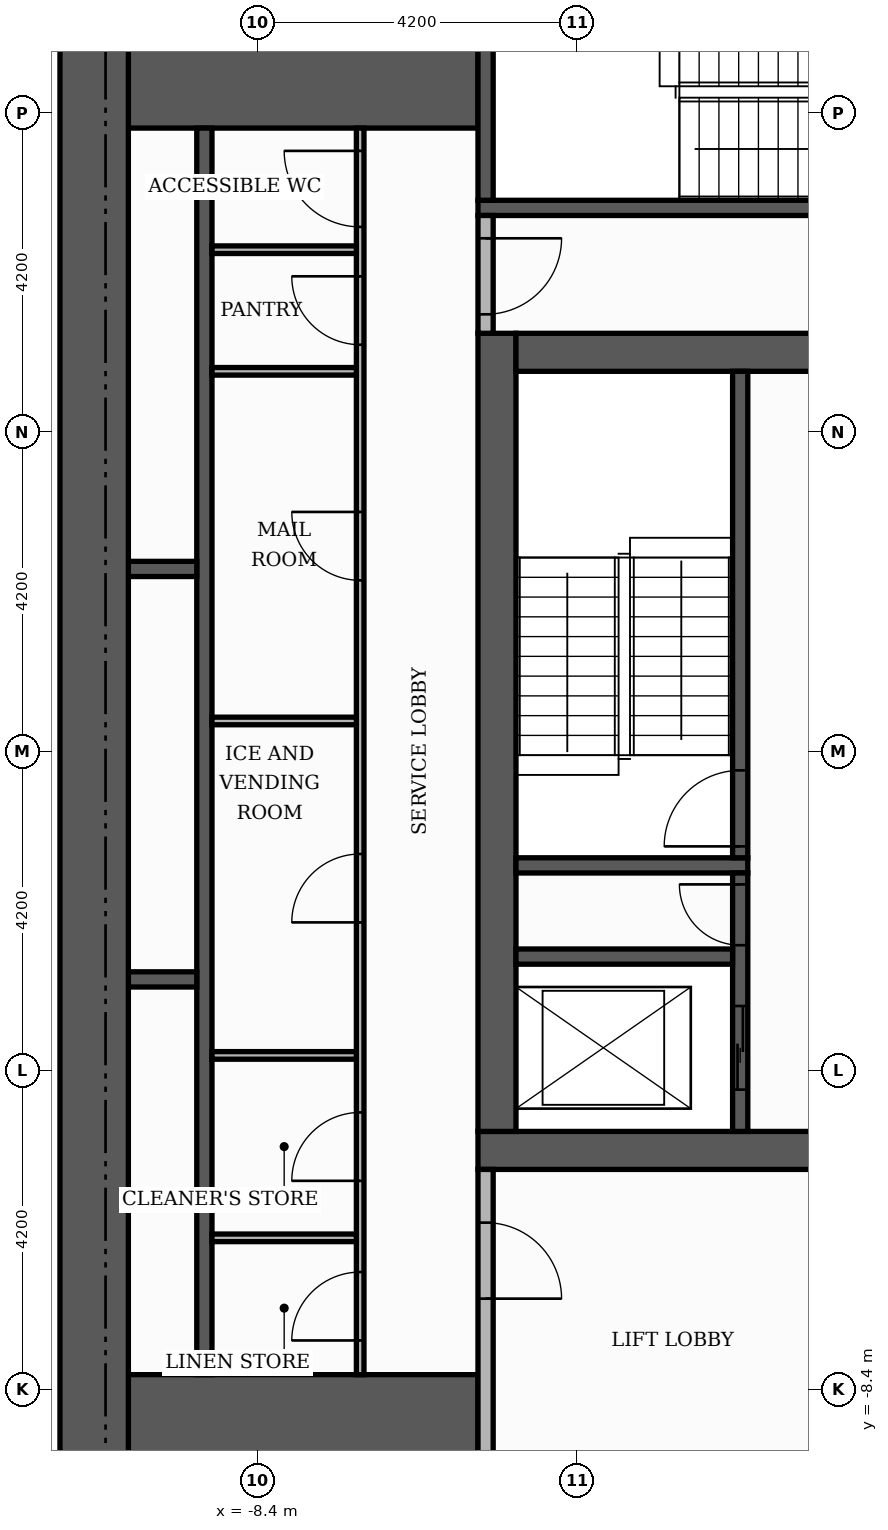
"""IFC4 building model, lengths in metres.
Left out: names, types, materials, properties, quantities, classifications, styles, units other than length and angle.
Written with IfcOpenShell. Run it as: python <this file> out.ifc"""

import sys

from ifc_helpers import new_model, si_unit, direction, frame, frame_2d, origin, place, context, subcontext, project, spatial, rectangle, extrude, element, fill, save


model = new_model("IFC4")
c1 = context("Model", 3, precision=1e-05, world=origin(), true_north=direction((0.0, 1.0)))
c2 = subcontext(c1, "Body", "Model", "MODEL_VIEW")
j1 = project(units=[si_unit("LENGTHUNIT", "METRE"), si_unit("PLANEANGLEUNIT", "RADIAN")], contexts=[c1])
p1 = place(None, origin())
s1 = spatial("IfcSite", under=j1, at=p1, CompositionType="ELEMENT")
p2 = place(p1, origin())
s2 = spatial("IfcBuilding", under=s1, at=p2, CompositionType="ELEMENT")
p3 = place(p2, frame((0.0, 0.0, 204.0)))
s3 = spatial("IfcBuildingStorey", under=s2, at=p3, CompositionType="ELEMENT", Elevation=204.0)
p4 = place(p3, frame((-5.5, -5.25, 0.0), z_axis=(0.0, 0.0, 1.0), x_axis=(1.0, 0.0, 0.0)))
e1 = element("IfcWall", 1, at=p4, inside=s3, PredefinedType="SHEAR", context=c2, shape_type="SweptSolid", body=[
    extrude(rectangle(XDim=11.0, YDim=0.5, at=frame_2d((5.5, 0.0))), origin(), (0.0, 0.0, 1.0), 3.48),
])
p5 = place(p4, frame((4.9, 0.0, 0.0)))
e2 = element("IfcOpeningElement", 2, at=p5, cuts=e1, PredefinedType="OPENING", context=c2, shape_type="SweptSolid", body=[
    extrude(rectangle(XDim=1.2, YDim=2.1, at=frame_2d((0.6, 1.05))), frame((0.0, 0.26, 0.0), z_axis=(0.0, -1.0, 0.0), x_axis=(1.0, 0.0, 0.0)), (0.0, 0.0, 1.0), 0.52),
])
p6 = place(p3, frame((-5.25, -5.0, 0.0), z_axis=(0.0, 0.0, 1.0), x_axis=(0.0, 1.0, 0.0)))
e3 = element("IfcWall", 3, at=p6, inside=s3, PredefinedType="SHEAR", context=c2, shape_type="SweptSolid", body=[
    extrude(rectangle(XDim=10.5, YDim=0.5, at=frame_2d((5.25, 0.0))), origin(), (0.0, 0.0, 1.0), 3.48),
])
p7 = place(p3, frame((-5.0, 5.25, 0.0), z_axis=(0.0, 0.0, 1.0), x_axis=(1.0, 0.0, 0.0)))
e4 = element("IfcWall", 4, at=p7, inside=s3, PredefinedType="SHEAR", context=c2, shape_type="SweptSolid", body=[
    extrude(rectangle(XDim=10.0, YDim=0.5, at=frame_2d((5.0, 0.0))), origin(), (0.0, 0.0, 1.0), 3.48),
])
p8 = place(p7, frame((4.4, 0.0, 0.0)))
e5 = element("IfcOpeningElement", 5, at=p8, cuts=e4, PredefinedType="OPENING", context=c2, shape_type="SweptSolid", body=[
    extrude(rectangle(XDim=1.2, YDim=2.1, at=frame_2d((0.6, 1.05))), frame((0.0, 0.26, 0.0), z_axis=(0.0, -1.0, 0.0), x_axis=(1.0, 0.0, 0.0)), (0.0, 0.0, 1.0), 0.52),
])
for number, where, z_axis, x_axis in (
    (6, (-10.1, -9.15, 0.0), (0.0, 0.0, 1.0), (1.0, 0.0, 0.0)),
    (7, (-10.1, 9.15, 0.0), (0.0, 0.0, 1.0), (1.0, 0.0, 0.0)),
):
    element("IfcWall", number, at=place(p3, frame(where, z_axis=z_axis, x_axis=x_axis)), inside=s3, PredefinedType="SHEAR", context=c2, shape_type="SweptSolid", body=[
        extrude(rectangle(XDim=4.6, YDim=1.9, at=frame_2d((2.3, 0.0))), origin(), (0.0, 0.0, 1.0), 3.48),
    ])
p9 = place(p3, frame((-5.0, -1.5, 0.0), z_axis=(0.0, 0.0, 1.0), x_axis=(1.0, 0.0, 0.0)))
e8 = element("IfcWall", 8, at=p9, inside=s3, PredefinedType="SHEAR", context=c2, shape_type="SweptSolid", body=[
    extrude(rectangle(XDim=3.05, YDim=0.2, at=frame_2d((1.525, 0.0))), origin(), (0.0, 0.0, 1.0), 3.48),
])
p10 = place(p3, frame((-2.05, -1.4, 0.0), z_axis=(0.0, 0.0, 1.0), x_axis=(0.0, 1.0, 0.0)))
e9 = element("IfcWall", 9, at=p10, inside=s3, PredefinedType="SHEAR", context=c2, shape_type="SweptSolid", body=[
    extrude(rectangle(XDim=6.4, YDim=0.2, at=frame_2d((3.2, 0.0))), origin(), (0.0, 0.0, 1.0), 3.48),
])
p11 = place(p10, frame((0.15, 0.0, 0.0)))
e10 = element("IfcOpeningElement", 10, at=p11, cuts=e9, PredefinedType="OPENING", context=c2, shape_type="SweptSolid", body=[
    extrude(rectangle(XDim=1.0, YDim=2.1, at=frame_2d((0.5, 1.05))), frame((0.0, 0.11, 0.0), z_axis=(0.0, -1.0, 0.0), x_axis=(1.0, 0.0, 0.0)), (0.0, 0.0, 1.0), 0.22),
])
p12 = place(p3, frame((-5.5, 7.15, 0.0), z_axis=(0.0, 0.0, 1.0), x_axis=(1.0, 0.0, 0.0)))
e11 = element("IfcWall", 11, at=p12, inside=s3, PredefinedType="SHEAR", context=c2, shape_type="SweptSolid", body=[
    extrude(rectangle(XDim=6.8, YDim=0.2, at=frame_2d((3.4, 0.0))), origin(), (0.0, 0.0, 1.0), 3.48),
])
p13 = place(p3, frame((-5.4, 7.25, 0.0), z_axis=(0.0, 0.0, 1.0), x_axis=(0.0, 1.0, 0.0)))
e12 = element("IfcWall", 12, at=p13, inside=s3, PredefinedType="SHEAR", context=c2, shape_type="SweptSolid", body=[
    extrude(rectangle(XDim=2.85, YDim=0.2, at=frame_2d((1.425, 0.0))), origin(), (0.0, 0.0, 1.0), 3.48),
])
p14 = place(p3, frame((-9.1, -8.2, 0.0), z_axis=(0.0, 0.0, 1.0), x_axis=(0.0, 1.0, 0.0)))
e13 = element("IfcWall", 13, at=p14, inside=s3, PredefinedType="SHEAR", context=c2, shape_type="SweptSolid", body=[
    extrude(rectangle(XDim=16.4, YDim=0.2, at=frame_2d((8.2, 0.0))), origin(), (0.0, 0.0, 1.0), 3.48),
])
p15 = place(p3, frame((-2.05, -5.0, 0.0), z_axis=(0.0, 0.0, 1.0), x_axis=(0.0, 1.0, 0.0)))
e14 = element("IfcWall", 14, at=p15, inside=s3, PredefinedType="SHEAR", context=c2, shape_type="SweptSolid", body=[
    extrude(rectangle(XDim=3.4, YDim=0.2, at=frame_2d((1.7, 0.0))), origin(), (0.0, 0.0, 1.0), 3.48),
])
p16 = place(p15, frame((0.55, 0.0, 0.0)))
e15 = element("IfcOpeningElement", 15, at=p16, cuts=e14, PredefinedType="OPENING", context=c2, shape_type="SweptSolid", body=[
    extrude(rectangle(XDim=1.1, YDim=2.1, at=frame_2d((0.55, 1.05))), frame((0.0, 0.11, 0.0), z_axis=(0.0, -1.0, 0.0), x_axis=(1.0, 0.0, 0.0)), (0.0, 0.0, 1.0), 0.22),
])
p17 = place(p15, frame((2.45, 0.0, 0.0)))
e16 = element("IfcOpeningElement", 16, at=p17, cuts=e14, PredefinedType="OPENING", context=c2, shape_type="SweptSolid", body=[
    extrude(rectangle(XDim=0.8, YDim=2.1, at=frame_2d((0.4, 1.05))), frame((0.0, 0.11, 0.0), z_axis=(0.0, -1.0, 0.0), x_axis=(1.0, 0.0, 0.0)), (0.0, 0.0, 1.0), 0.22),
])
p18 = place(p3, frame((-10.1, -3.0, 0.0), z_axis=(0.0, 0.0, 1.0), x_axis=(1.0, 0.0, 0.0)))
e17 = element("IfcWall", 17, at=p18, inside=s3, PredefinedType="SHEAR", context=c2, shape_type="SweptSolid", body=[
    extrude(rectangle(XDim=0.9, YDim=0.2, at=frame_2d((0.45, 0.0))), origin(), (0.0, 0.0, 1.0), 3.48),
])
p19 = place(p3, frame((-5.0, -2.7, 0.0), z_axis=(0.0, 0.0, 1.0), x_axis=(1.0, 0.0, 0.0)))
e18 = element("IfcWall", 18, at=p19, inside=s3, PredefinedType="SHEAR", context=c2, shape_type="SweptSolid", body=[
    extrude(rectangle(XDim=2.85, YDim=0.2, at=frame_2d((1.425, 0.0))), origin(), (0.0, 0.0, 1.0), 3.48),
])
p20 = place(p3, frame((-10.1, 2.4, 0.0), z_axis=(0.0, 0.0, 1.0), x_axis=(1.0, 0.0, 0.0)))
e19 = element("IfcWall", 19, at=p20, inside=s3, PredefinedType="SHEAR", context=c2, shape_type="SweptSolid", body=[
    extrude(rectangle(XDim=0.9, YDim=0.2, at=frame_2d((0.45, 0.0))), origin(), (0.0, 0.0, 1.0), 3.48),
])
p21 = place(p3, frame((-10.55, -10.1, 0.0), z_axis=(0.0, 0.0, 1.0), x_axis=(0.0, 1.0, 0.0)))
e20 = element("IfcWall", 20, at=p21, inside=s3, PredefinedType="SHEAR", context=c2, shape_type="SweptSolid", body=[
    extrude(rectangle(XDim=20.2, YDim=0.9, at=frame_2d((10.1, 0.0))), origin(), (0.0, 0.0, 1.0), 3.48),
])
p22 = place(p3, frame((-5.4, -10.1, 0.0), z_axis=(0.0, 0.0, 1.0), x_axis=(0.0, 1.0, 0.0)))
e21 = element("IfcWall", 21, at=p22, inside=s3, PredefinedType="PARTITIONING", context=c2, shape_type="SweptSolid", body=[
    extrude(rectangle(XDim=4.6, YDim=0.2, at=frame_2d((2.3, 0.0))), origin(), (0.0, 0.0, 1.0), 3.48),
])
p23 = place(p22, frame((2.9, 0.0, 0.0)))
e22 = element("IfcOpeningElement", 22, at=p23, cuts=e21, PredefinedType="OPENING", context=c2, shape_type="SweptSolid", body=[
    extrude(rectangle(XDim=1.0, YDim=2.1, at=frame_2d((0.5, 1.05))), frame((0.0, 0.11, 0.0), z_axis=(0.0, -1.0, 0.0), x_axis=(1.0, 0.0, 0.0)), (0.0, 0.0, 1.0), 0.22),
])
p24 = place(p3, frame((-7.05, -8.2, 0.0), z_axis=(0.0, 0.0, 1.0), x_axis=(0.0, 1.0, 0.0)))
e23 = element("IfcWall", 23, at=p24, inside=s3, PredefinedType="PARTITIONING", context=c2, shape_type="SweptSolid", body=[
    extrude(rectangle(XDim=16.4, YDim=0.1, at=frame_2d((8.2, 0.0))), origin(), (0.0, 0.0, 1.0), 3.48),
])
p25 = place(p24, frame((0.45, 0.0, 0.0)))
e24 = element("IfcOpeningElement", 24, at=p25, cuts=e23, PredefinedType="OPENING", context=c2, shape_type="SweptSolid", body=[
    extrude(rectangle(XDim=0.9, YDim=2.1, at=frame_2d((0.45, 1.05))), frame((0.0, 0.06, 0.0), z_axis=(0.0, -1.0, 0.0), x_axis=(1.0, 0.0, 0.0)), (0.0, 0.0, 1.0), 0.12),
])
p26 = place(p24, frame((2.55, 0.0, 0.0)))
e25 = element("IfcOpeningElement", 25, at=p26, cuts=e23, PredefinedType="OPENING", context=c2, shape_type="SweptSolid", body=[
    extrude(rectangle(XDim=0.9, YDim=2.1, at=frame_2d((0.45, 1.05))), frame((0.0, 0.06, 0.0), z_axis=(0.0, -1.0, 0.0), x_axis=(1.0, 0.0, 0.0)), (0.0, 0.0, 1.0), 0.12),
])
p27 = place(p24, frame((5.95, 0.0, 0.0)))
e26 = element("IfcOpeningElement", 26, at=p27, cuts=e23, PredefinedType="OPENING", context=c2, shape_type="SweptSolid", body=[
    extrude(rectangle(XDim=0.9, YDim=2.1, at=frame_2d((0.45, 1.05))), frame((0.0, 0.06, 0.0), z_axis=(0.0, -1.0, 0.0), x_axis=(1.0, 0.0, 0.0)), (0.0, 0.0, 1.0), 0.12),
])
p28 = place(p24, frame((10.45, 0.0, 0.0)))
e27 = element("IfcOpeningElement", 27, at=p28, cuts=e23, PredefinedType="OPENING", context=c2, shape_type="SweptSolid", body=[
    extrude(rectangle(XDim=0.9, YDim=2.1, at=frame_2d((0.45, 1.05))), frame((0.0, 0.06, 0.0), z_axis=(0.0, -1.0, 0.0), x_axis=(1.0, 0.0, 0.0)), (0.0, 0.0, 1.0), 0.12),
])
p29 = place(p24, frame((13.55, 0.0, 0.0)))
e28 = element("IfcOpeningElement", 28, at=p29, cuts=e23, PredefinedType="OPENING", context=c2, shape_type="SweptSolid", body=[
    extrude(rectangle(XDim=0.9, YDim=2.1, at=frame_2d((0.45, 1.05))), frame((0.0, 0.06, 0.0), z_axis=(0.0, -1.0, 0.0), x_axis=(1.0, 0.0, 0.0)), (0.0, 0.0, 1.0), 0.12),
])
p30 = place(p24, frame((15.1, 0.0, 0.0)))
e29 = element("IfcOpeningElement", 29, at=p30, cuts=e23, PredefinedType="OPENING", context=c2, shape_type="SweptSolid", body=[
    extrude(rectangle(XDim=1.0, YDim=2.1, at=frame_2d((0.5, 1.05))), frame((0.0, 0.06, 0.0), z_axis=(0.0, -1.0, 0.0), x_axis=(1.0, 0.0, 0.0)), (0.0, 0.0, 1.0), 0.12),
])
for number, where, z_axis, x_axis in (
    (30, (-9.0, -6.4, 0.0), (0.0, 0.0, 1.0), (1.0, 0.0, 0.0)),
    (31, (-9.0, -4.0, 0.0), (0.0, 0.0, 1.0), (1.0, 0.0, 0.0)),
    (32, (-9.0, 0.4, 0.0), (0.0, 0.0, 1.0), (1.0, 0.0, 0.0)),
    (33, (-9.0, 5.0, 0.0), (0.0, 0.0, 1.0), (1.0, 0.0, 0.0)),
):
    element("IfcWall", number, at=place(p3, frame(where, z_axis=z_axis, x_axis=x_axis)), inside=s3, PredefinedType="PARTITIONING", context=c2, shape_type="SweptSolid", body=[
        extrude(rectangle(XDim=1.9, YDim=0.1, at=frame_2d((0.95, 0.0))), origin(), (0.0, 0.0, 1.0), 3.48),
    ])
p31 = place(p3, frame((-5.4, 5.5, 0.0), z_axis=(0.0, 0.0, 1.0), x_axis=(0.0, 1.0, 0.0)))
e34 = element("IfcWall", 34, at=p31, inside=s3, PredefinedType="PARTITIONING", context=c2, shape_type="SweptSolid", body=[
    extrude(rectangle(XDim=1.55, YDim=0.2, at=frame_2d((0.775, 0.0))), origin(), (0.0, 0.0, 1.0), 3.48),
])
p32 = place(p31, frame((0.25, 0.0, 0.0)))
e35 = element("IfcOpeningElement", 35, at=p32, cuts=e34, PredefinedType="OPENING", context=c2, shape_type="SweptSolid", body=[
    extrude(rectangle(XDim=1.0, YDim=2.1, at=frame_2d((0.5, 1.05))), frame((0.0, 0.11, 0.0), z_axis=(0.0, -1.0, 0.0), x_axis=(1.0, 0.0, 0.0)), (0.0, 0.0, 1.0), 0.22),
])
p33 = place(p3, frame((-9.0, 6.6, 0.0), z_axis=(0.0, 0.0, 1.0), x_axis=(1.0, 0.0, 0.0)))
e36 = element("IfcWall", 36, at=p33, inside=s3, PredefinedType="PARTITIONING", context=c2, shape_type="SweptSolid", body=[
    extrude(rectangle(XDim=1.9, YDim=0.1, at=frame_2d((0.95, 0.0))), origin(), (0.0, 0.0, 1.0), 3.48),
])
p34 = place(p16, origin())
e37 = element("IfcDoor", 37, at=p34, inside=s3, OperationType="SLIDING_TO_LEFT", PredefinedType="DOOR", context=c2, shape_type="SweptSolid", body=[
    extrude(rectangle(XDim=1.1, YDim=2.1, at=frame_2d((0.55, 1.05))), frame((0.0, 0.025, 0.0), z_axis=(0.0, -1.0, 0.0), x_axis=(1.0, 0.0, 0.0)), (0.0, 0.0, 1.0), 0.05),
])
fill(e15, e37)
p35 = place(p11, origin())
e38 = element("IfcDoor", 38, at=p35, inside=s3, OperationType="SINGLE_SWING_LEFT", PredefinedType="DOOR", context=c2, shape_type="SweptSolid", body=[
    extrude(rectangle(XDim=1.0, YDim=2.1, at=frame_2d((0.5, 1.05))), frame((0.0, 0.025, 0.0), z_axis=(0.0, -1.0, 0.0), x_axis=(1.0, 0.0, 0.0)), (0.0, 0.0, 1.0), 0.05),
])
fill(e10, e38)
p36 = place(p17, origin())
e39 = element("IfcDoor", 39, at=p36, inside=s3, OperationType="SINGLE_SWING_RIGHT", PredefinedType="DOOR", context=c2, shape_type="SweptSolid", body=[
    extrude(rectangle(XDim=0.8, YDim=2.1, at=frame_2d((0.4, 1.05))), frame((0.0, 0.025, 0.0), z_axis=(0.0, -1.0, 0.0), x_axis=(1.0, 0.0, 0.0)), (0.0, 0.0, 1.0), 0.05),
])
fill(e16, e39)
p37 = place(p32, frame((1.0, 0.0, 0.0), z_axis=(0.0, 0.0, 1.0), x_axis=(-1.0, 0.0, 0.0)))
e40 = element("IfcDoor", 40, at=p37, inside=s3, OperationType="SINGLE_SWING_RIGHT", PredefinedType="DOOR", context=c2, shape_type="SweptSolid", body=[
    extrude(rectangle(XDim=1.0, YDim=2.1, at=frame_2d((0.5, 1.05))), frame((0.0, 0.025, 0.0), z_axis=(0.0, -1.0, 0.0), x_axis=(1.0, 0.0, 0.0)), (0.0, 0.0, 1.0), 0.05),
])
fill(e35, e40)
p38 = place(p23, frame((1.0, 0.0, 0.0), z_axis=(0.0, 0.0, 1.0), x_axis=(-1.0, 0.0, 0.0)))
e41 = element("IfcDoor", 41, at=p38, inside=s3, OperationType="SINGLE_SWING_LEFT", PredefinedType="DOOR", context=c2, shape_type="SweptSolid", body=[
    extrude(rectangle(XDim=1.0, YDim=2.1, at=frame_2d((0.5, 1.05))), frame((0.0, 0.025, 0.0), z_axis=(0.0, -1.0, 0.0), x_axis=(1.0, 0.0, 0.0)), (0.0, 0.0, 1.0), 0.05),
])
fill(e22, e41)
p39 = place(p25, origin())
e42 = element("IfcDoor", 42, at=p39, inside=s3, OperationType="SINGLE_SWING_LEFT", PredefinedType="DOOR", context=c2, shape_type="SweptSolid", body=[
    extrude(rectangle(XDim=0.9, YDim=2.1, at=frame_2d((0.45, 1.05))), frame((0.0, 0.025, 0.0), z_axis=(0.0, -1.0, 0.0), x_axis=(1.0, 0.0, 0.0)), (0.0, 0.0, 1.0), 0.05),
])
fill(e24, e42)
p40 = place(p26, origin())
e43 = element("IfcDoor", 43, at=p40, inside=s3, OperationType="SINGLE_SWING_LEFT", PredefinedType="DOOR", context=c2, shape_type="SweptSolid", body=[
    extrude(rectangle(XDim=0.9, YDim=2.1, at=frame_2d((0.45, 1.05))), frame((0.0, 0.025, 0.0), z_axis=(0.0, -1.0, 0.0), x_axis=(1.0, 0.0, 0.0)), (0.0, 0.0, 1.0), 0.05),
])
fill(e25, e43)
p41 = place(p27, origin())
e44 = element("IfcDoor", 44, at=p41, inside=s3, OperationType="SINGLE_SWING_LEFT", PredefinedType="DOOR", context=c2, shape_type="SweptSolid", body=[
    extrude(rectangle(XDim=0.9, YDim=2.1, at=frame_2d((0.45, 1.05))), frame((0.0, 0.025, 0.0), z_axis=(0.0, -1.0, 0.0), x_axis=(1.0, 0.0, 0.0)), (0.0, 0.0, 1.0), 0.05),
])
fill(e26, e44)
p42 = place(p28, origin())
e45 = element("IfcDoor", 45, at=p42, inside=s3, OperationType="SINGLE_SWING_RIGHT", PredefinedType="DOOR", context=c2, shape_type="SweptSolid", body=[
    extrude(rectangle(XDim=0.9, YDim=2.1, at=frame_2d((0.45, 1.05))), frame((0.0, 0.025, 0.0), z_axis=(0.0, -1.0, 0.0), x_axis=(1.0, 0.0, 0.0)), (0.0, 0.0, 1.0), 0.05),
])
fill(e27, e45)
p43 = place(p29, origin())
e46 = element("IfcDoor", 46, at=p43, inside=s3, OperationType="SINGLE_SWING_RIGHT", PredefinedType="DOOR", context=c2, shape_type="SweptSolid", body=[
    extrude(rectangle(XDim=0.9, YDim=2.1, at=frame_2d((0.45, 1.05))), frame((0.0, 0.025, 0.0), z_axis=(0.0, -1.0, 0.0), x_axis=(1.0, 0.0, 0.0)), (0.0, 0.0, 1.0), 0.05),
])
fill(e28, e46)
p44 = place(p30, origin())
e47 = element("IfcDoor", 47, at=p44, inside=s3, OperationType="SINGLE_SWING_RIGHT", PredefinedType="DOOR", context=c2, shape_type="SweptSolid", body=[
    extrude(rectangle(XDim=1.0, YDim=2.1, at=frame_2d((0.5, 1.05))), frame((0.0, 0.025, 0.0), z_axis=(0.0, -1.0, 0.0), x_axis=(1.0, 0.0, 0.0)), (0.0, 0.0, 1.0), 0.05),
])
fill(e29, e47)
save(model, sys.argv[1])
